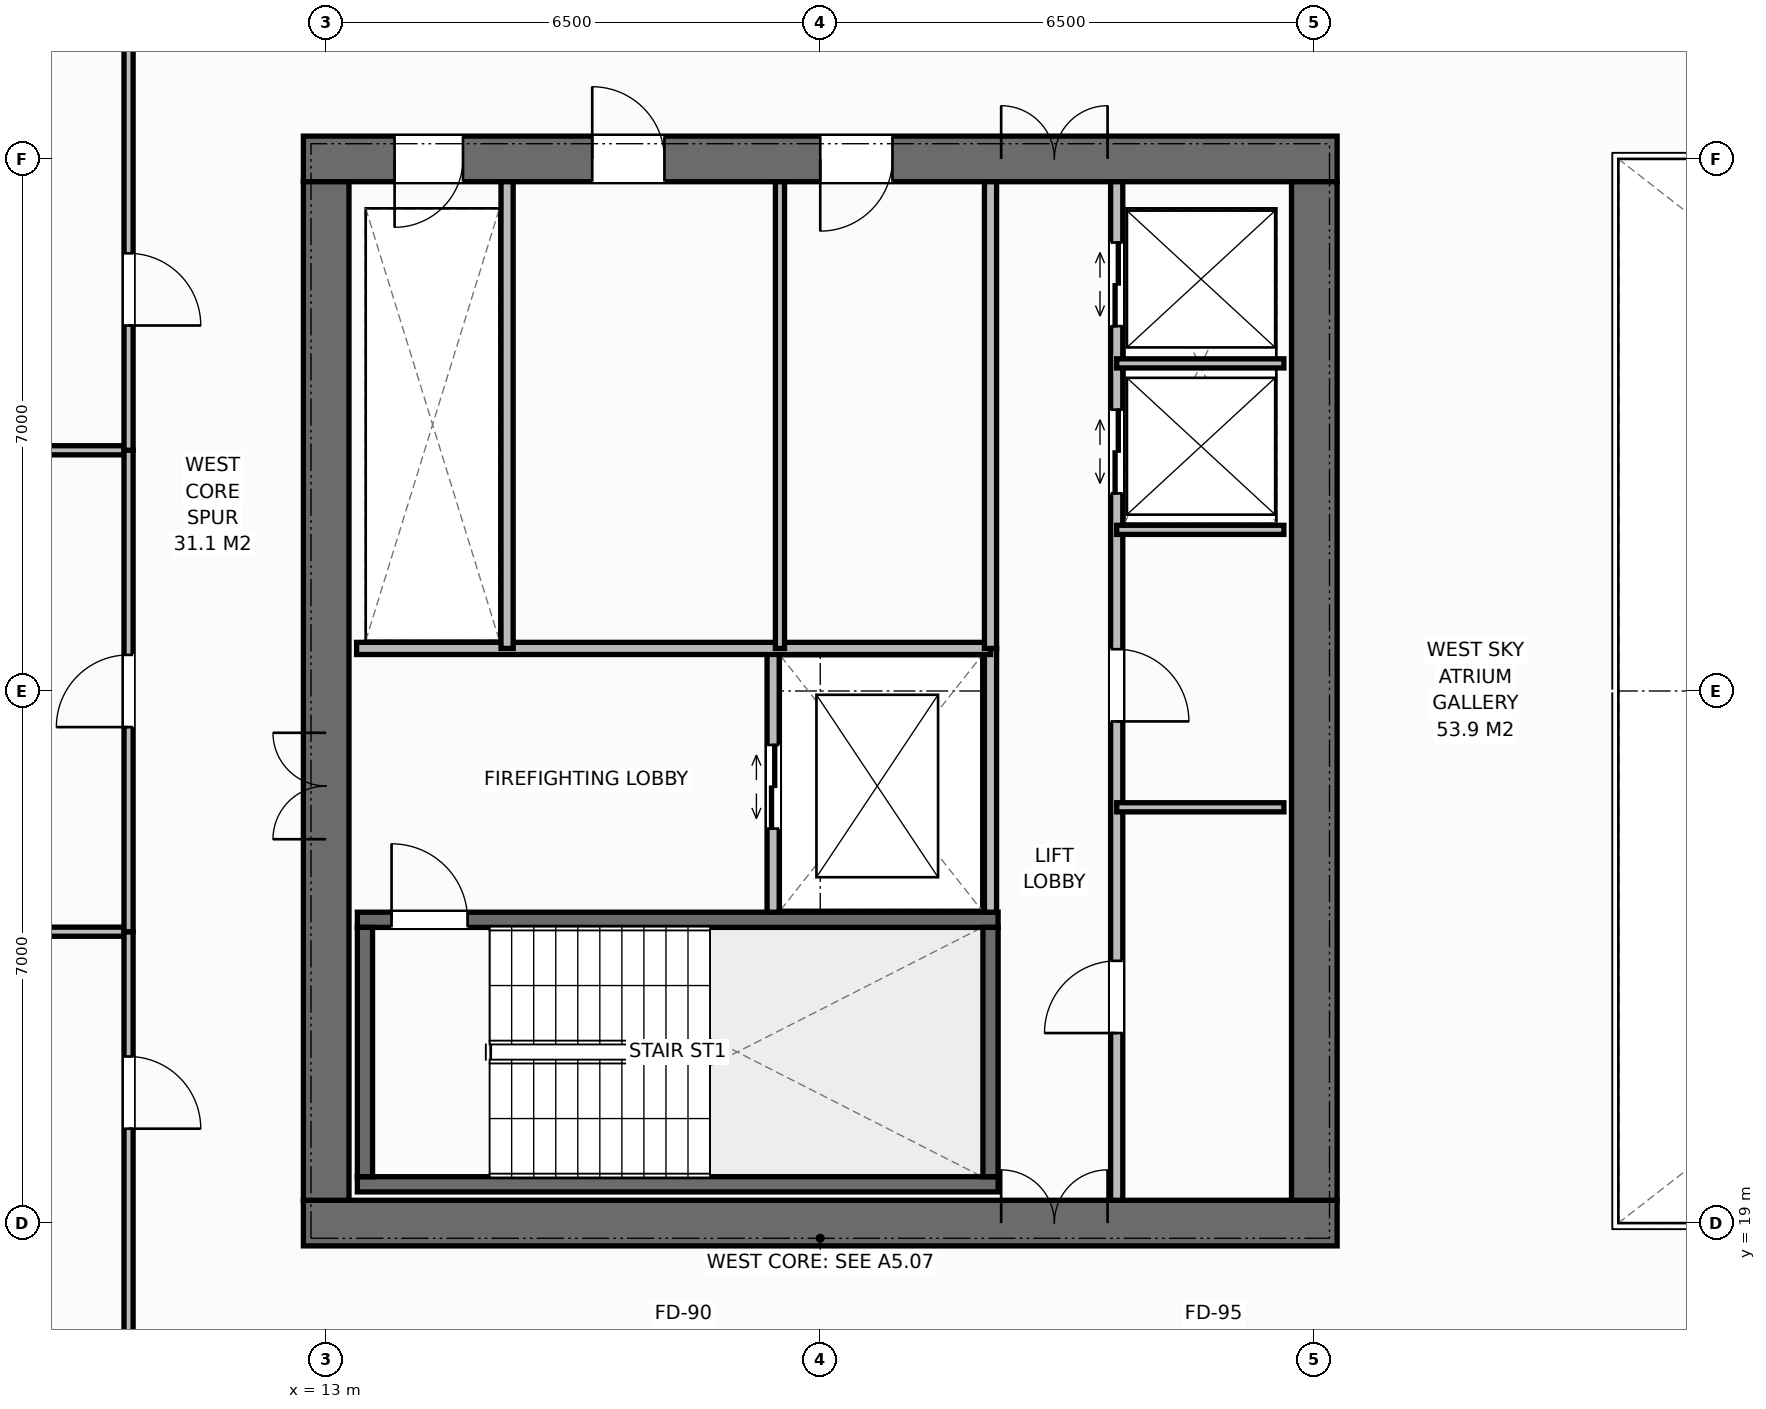
"""IFC4 building model, lengths in metres.
Left out: names, types, materials, properties, quantities, classifications, styles, units other than length and angle.
Written with IfcOpenShell. Run it as: python <this file> out.ifc"""

import sys

from ifc_helpers import new_model, si_unit, direction, frame, frame_2d, origin, place, context, subcontext, project, spatial, rectangle, extrude, element, fill, save


model = new_model("IFC4")
c1 = context("Model", 3, precision=1e-05, world=origin(), true_north=direction((0.0, 1.0)))
c2 = subcontext(c1, "Body", "Model", "MODEL_VIEW")
j1 = project(units=[si_unit("LENGTHUNIT", "METRE"), si_unit("PLANEANGLEUNIT", "RADIAN")], contexts=[c1])
p1 = place(None, origin())
s1 = spatial("IfcSite", under=j1, at=p1, CompositionType="ELEMENT")
p2 = place(p1, origin())
s2 = spatial("IfcBuilding", under=s1, at=p2, CompositionType="ELEMENT")
p3 = place(p2, frame((0.0, 0.0, 155.6)))
s3 = spatial("IfcBuildingStorey", under=s2, at=p3, CompositionType="ELEMENT", Elevation=155.6)
p4 = place(p3, frame((12.7, 19.0, 0.0), z_axis=(0.0, 0.0, 1.0), x_axis=(1.0, 0.0, 0.0)))
e1 = element("IfcWall", 1, at=p4, inside=s3, PredefinedType="SHEAR", context=c2, shape_type="SweptSolid", body=[
    extrude(rectangle(XDim=13.6, YDim=0.6, at=frame_2d((6.8, 0.0))), origin(), (0.0, 0.0, 1.0), 3.8),
])
p5 = place(p4, frame((9.18, 0.0, 0.0)))
e2 = element("IfcOpeningElement", 2, at=p5, cuts=e1, PredefinedType="OPENING", context=c2, shape_type="SweptSolid", body=[
    extrude(rectangle(XDim=1.4, YDim=2.2, at=frame_2d((0.7, 1.1))), frame((0.0, 0.31, 0.0), z_axis=(0.0, -1.0, 0.0), x_axis=(1.0, 0.0, 0.0)), (0.0, 0.0, 1.0), 0.62),
])
p6 = place(p3, frame((12.7, 33.0, 0.0), z_axis=(0.0, 0.0, 1.0), x_axis=(1.0, 0.0, 0.0)))
e3 = element("IfcWall", 3, at=p6, inside=s3, PredefinedType="SHEAR", context=c2, shape_type="SweptSolid", body=[
    extrude(rectangle(XDim=13.6, YDim=0.6, at=frame_2d((6.8, 0.0))), origin(), (0.0, 0.0, 1.0), 3.8),
])
p7 = place(p6, frame((1.2, 0.0, 0.0)))
e4 = element("IfcOpeningElement", 4, at=p7, cuts=e3, PredefinedType="OPENING", context=c2, shape_type="SweptSolid", body=[
    extrude(rectangle(XDim=0.9, YDim=2.15, at=frame_2d((0.45, 1.075))), frame((0.0, 0.31, 0.0), z_axis=(0.0, -1.0, 0.0), x_axis=(1.0, 0.0, 0.0)), (0.0, 0.0, 1.0), 0.62),
])
p8 = place(p6, frame((3.8, 0.0, 0.0)))
e5 = element("IfcOpeningElement", 5, at=p8, cuts=e3, PredefinedType="OPENING", context=c2, shape_type="SweptSolid", body=[
    extrude(rectangle(XDim=0.95, YDim=2.15, at=frame_2d((0.475, 1.075))), frame((0.0, 0.31, 0.0), z_axis=(0.0, -1.0, 0.0), x_axis=(1.0, 0.0, 0.0)), (0.0, 0.0, 1.0), 0.62),
])
p9 = place(p6, frame((6.8, 0.0, 0.0)))
e6 = element("IfcOpeningElement", 6, at=p9, cuts=e3, PredefinedType="OPENING", context=c2, shape_type="SweptSolid", body=[
    extrude(rectangle(XDim=0.95, YDim=2.15, at=frame_2d((0.475, 1.075))), frame((0.0, 0.31, 0.0), z_axis=(0.0, -1.0, 0.0), x_axis=(1.0, 0.0, 0.0)), (0.0, 0.0, 1.0), 0.62),
])
p10 = place(p6, frame((9.18, 0.0, 0.0)))
e7 = element("IfcOpeningElement", 7, at=p10, cuts=e3, PredefinedType="OPENING", context=c2, shape_type="SweptSolid", body=[
    extrude(rectangle(XDim=1.4, YDim=2.2, at=frame_2d((0.7, 1.1))), frame((0.0, 0.31, 0.0), z_axis=(0.0, -1.0, 0.0), x_axis=(1.0, 0.0, 0.0)), (0.0, 0.0, 1.0), 0.62),
])
p11 = place(p3, frame((13.0, 19.3, 0.0), z_axis=(0.0, 0.0, 1.0), x_axis=(0.0, 1.0, 0.0)))
e8 = element("IfcWall", 8, at=p11, inside=s3, PredefinedType="SHEAR", context=c2, shape_type="SweptSolid", body=[
    extrude(rectangle(XDim=13.4, YDim=0.6, at=frame_2d((6.7, 0.0))), origin(), (0.0, 0.0, 1.0), 3.8),
])
p12 = place(p11, frame((4.75, 0.0, 0.0)))
e9 = element("IfcOpeningElement", 9, at=p12, cuts=e8, PredefinedType="OPENING", context=c2, shape_type="SweptSolid", body=[
    extrude(rectangle(XDim=1.4, YDim=2.2, at=frame_2d((0.7, 1.1))), frame((0.0, 0.31, 0.0), z_axis=(0.0, -1.0, 0.0), x_axis=(1.0, 0.0, 0.0)), (0.0, 0.0, 1.0), 0.62),
])
p13 = place(p3, frame((26.0, 19.3, 0.0), z_axis=(0.0, 0.0, 1.0), x_axis=(0.0, 1.0, 0.0)))
e10 = element("IfcWall", 10, at=p13, inside=s3, PredefinedType="SHEAR", context=c2, shape_type="SweptSolid", body=[
    extrude(rectangle(XDim=13.4, YDim=0.6, at=frame_2d((6.7, 0.0))), origin(), (0.0, 0.0, 1.0), 3.8),
])
p14 = place(p3, frame((13.41, 19.51, 0.0), z_axis=(0.0, 0.0, 1.0), x_axis=(1.0, 0.0, 0.0)))
e11 = element("IfcWall", 11, at=p14, inside=s3, PredefinedType="SHEAR", context=c2, shape_type="SweptSolid", body=[
    extrude(rectangle(XDim=8.43, YDim=0.2, at=frame_2d((4.215, 0.0))), origin(), (0.0, 0.0, 1.0), 3.8),
])
p15 = place(p3, frame((13.41, 22.99, 0.0), z_axis=(0.0, 0.0, 1.0), x_axis=(1.0, 0.0, 0.0)))
e12 = element("IfcWall", 12, at=p15, inside=s3, PredefinedType="SHEAR", context=c2, shape_type="SweptSolid", body=[
    extrude(rectangle(XDim=8.43, YDim=0.2, at=frame_2d((4.215, 0.0))), origin(), (0.0, 0.0, 1.0), 3.8),
])
p16 = place(p15, frame((0.45, 0.0, 0.0)))
e13 = element("IfcOpeningElement", 13, at=p16, cuts=e12, PredefinedType="OPENING", context=c2, shape_type="SweptSolid", body=[
    extrude(rectangle(XDim=1.0, YDim=2.15, at=frame_2d((0.5, 1.075))), frame((0.0, 0.11, 0.0), z_axis=(0.0, -1.0, 0.0), x_axis=(1.0, 0.0, 0.0)), (0.0, 0.0, 1.0), 0.22),
])
for number, where, z_axis, x_axis in (
    (14, (13.51, 19.61, 0.0), (0.0, 0.0, 1.0), (0.0, 1.0, 0.0)),
    (15, (21.74, 19.61, 0.0), (0.0, 0.0, 1.0), (0.0, 1.0, 0.0)),
):
    element("IfcWall", number, at=place(p3, frame(where, z_axis=z_axis, x_axis=x_axis)), inside=s3, PredefinedType="SHEAR", context=c2, shape_type="SweptSolid", body=[
        extrude(rectangle(XDim=3.28, YDim=0.2, at=frame_2d((1.64, 0.0))), origin(), (0.0, 0.0, 1.0), 3.8),
    ])
p17 = place(p3, frame((21.74, 23.09, 0.0), z_axis=(0.0, 0.0, 1.0), x_axis=(0.0, 1.0, 0.0)))
e16 = element("IfcWall", 16, at=p17, inside=s3, PredefinedType="STANDARD", context=c2, shape_type="SweptSolid", body=[
    extrude(rectangle(XDim=3.47, YDim=0.16, at=frame_2d((1.735, 0.0))), origin(), (0.0, 0.0, 1.0), 3.572),
])
p18 = place(p3, frame((18.88, 23.09, 0.0), z_axis=(0.0, 0.0, 1.0), x_axis=(0.0, 1.0, 0.0)))
e17 = element("IfcWall", 17, at=p18, inside=s3, PredefinedType="STANDARD", context=c2, shape_type="SweptSolid", body=[
    extrude(rectangle(XDim=3.47, YDim=0.16, at=frame_2d((1.735, 0.0))), origin(), (0.0, 0.0, 1.0), 3.572),
])
p19 = place(p18, frame((1.1, 0.0, 0.0)))
e18 = element("IfcOpeningElement", 18, at=p19, cuts=e17, PredefinedType="OPENING", context=c2, shape_type="SweptSolid", body=[
    extrude(rectangle(XDim=1.1, YDim=2.2, at=frame_2d((0.55, 1.1))), frame((0.0, 0.09, 0.0), z_axis=(0.0, -1.0, 0.0), x_axis=(1.0, 0.0, 0.0)), (0.0, 0.0, 1.0), 0.18),
])
p20 = place(p3, frame((13.4, 26.56, 0.0), z_axis=(0.0, 0.0, 1.0), x_axis=(1.0, 0.0, 0.0)))
e19 = element("IfcWall", 19, at=p20, inside=s3, PredefinedType="STANDARD", context=c2, shape_type="SweptSolid", body=[
    extrude(rectangle(XDim=8.34, YDim=0.16, at=frame_2d((4.17, 0.0))), origin(), (0.0, 0.0, 1.0), 3.572),
])
p21 = place(p3, frame((15.38, 26.56, 0.0), z_axis=(0.0, 0.0, 1.0), x_axis=(0.0, 1.0, 0.0)))
e20 = element("IfcWall", 20, at=p21, inside=s3, PredefinedType="STANDARD", context=c2, shape_type="SweptSolid", body=[
    extrude(rectangle(XDim=6.14, YDim=0.16, at=frame_2d((3.07, 0.0))), origin(), (0.0, 0.0, 1.0), 3.572),
])
p22 = place(p3, frame((18.97, 26.56, 0.0), z_axis=(0.0, 0.0, 1.0), x_axis=(0.0, 1.0, 0.0)))
e21 = element("IfcWall", 21, at=p22, inside=s3, PredefinedType="PARTITIONING", context=c2, shape_type="SweptSolid", body=[
    extrude(rectangle(XDim=6.14, YDim=0.12, at=frame_2d((3.07, 0.0))), origin(), (0.0, 0.0, 1.0), 3.572),
])
p23 = place(p3, frame((21.74, 26.56, 0.0), z_axis=(0.0, 0.0, 1.0), x_axis=(0.0, 1.0, 0.0)))
e22 = element("IfcWall", 22, at=p23, inside=s3, PredefinedType="STANDARD", context=c2, shape_type="SweptSolid", body=[
    extrude(rectangle(XDim=6.14, YDim=0.16, at=frame_2d((3.07, 0.0))), origin(), (0.0, 0.0, 1.0), 3.572),
])
p24 = place(p3, frame((23.4, 19.3, 0.0), z_axis=(0.0, 0.0, 1.0), x_axis=(0.0, 1.0, 0.0)))
e23 = element("IfcWall", 23, at=p24, inside=s3, PredefinedType="STANDARD", context=c2, shape_type="SweptSolid", body=[
    extrude(rectangle(XDim=13.4, YDim=0.16, at=frame_2d((6.7, 0.0))), origin(), (0.0, 0.0, 1.0), 3.572),
])
p25 = place(p24, frame((2.2, 0.0, 0.0)))
e24 = element("IfcOpeningElement", 24, at=p25, cuts=e23, PredefinedType="OPENING", context=c2, shape_type="SweptSolid", body=[
    extrude(rectangle(XDim=0.95, YDim=2.15, at=frame_2d((0.475, 1.075))), frame((0.0, 0.09, 0.0), z_axis=(0.0, -1.0, 0.0), x_axis=(1.0, 0.0, 0.0)), (0.0, 0.0, 1.0), 0.18),
])
p26 = place(p24, frame((6.3, 0.0, 0.0)))
e25 = element("IfcOpeningElement", 25, at=p26, cuts=e23, PredefinedType="OPENING", context=c2, shape_type="SweptSolid", body=[
    extrude(rectangle(XDim=0.95, YDim=2.15, at=frame_2d((0.475, 1.075))), frame((0.0, 0.09, 0.0), z_axis=(0.0, -1.0, 0.0), x_axis=(1.0, 0.0, 0.0)), (0.0, 0.0, 1.0), 0.18),
])
p27 = place(p24, frame((9.3, 0.0, 0.0)))
e26 = element("IfcOpeningElement", 26, at=p27, cuts=e23, PredefinedType="OPENING", context=c2, shape_type="SweptSolid", body=[
    extrude(rectangle(XDim=1.1, YDim=2.2, at=frame_2d((0.55, 1.1))), frame((0.0, 0.09, 0.0), z_axis=(0.0, -1.0, 0.0), x_axis=(1.0, 0.0, 0.0)), (0.0, 0.0, 1.0), 0.18),
])
p28 = place(p24, frame((11.5, 0.0, 0.0)))
e27 = element("IfcOpeningElement", 27, at=p28, cuts=e23, PredefinedType="OPENING", context=c2, shape_type="SweptSolid", body=[
    extrude(rectangle(XDim=1.1, YDim=2.2, at=frame_2d((0.55, 1.1))), frame((0.0, 0.09, 0.0), z_axis=(0.0, -1.0, 0.0), x_axis=(1.0, 0.0, 0.0)), (0.0, 0.0, 1.0), 0.18),
])
for number, where, z_axis, x_axis in (
    (28, (23.4, 24.47, 0.0), (0.0, 0.0, 1.0), (1.0, 0.0, 0.0)),
    (29, (23.4, 28.12, 0.0), (0.0, 0.0, 1.0), (1.0, 0.0, 0.0)),
    (30, (23.4, 30.31, 0.0), (0.0, 0.0, 1.0), (1.0, 0.0, 0.0)),
):
    element("IfcWall", number, at=place(p3, frame(where, z_axis=z_axis, x_axis=x_axis)), inside=s3, PredefinedType="PARTITIONING", context=c2, shape_type="SweptSolid", body=[
        extrude(rectangle(XDim=2.2, YDim=0.12, at=frame_2d((1.1, 0.0))), origin(), (0.0, 0.0, 1.0), 3.572),
    ])
p29 = place(p3, frame((3.82, 22.833, 0.0), z_axis=(0.0, 0.0, 1.0), x_axis=(1.0, 0.0, 0.0)))
e31 = element("IfcWall", 31, at=p29, inside=s3, PredefinedType="PARTITIONING", context=c2, shape_type="SweptSolid", body=[
    extrude(rectangle(XDim=6.58, YDim=0.12, at=frame_2d((3.29, 0.0))), origin(), (0.0, 0.0, 1.0), 3.572),
])
p30 = place(p3, frame((10.4, 16.5, 0.0), z_axis=(0.0, 0.0, 1.0), x_axis=(0.0, 1.0, 0.0)))
e32 = element("IfcWall", 32, at=p30, inside=s3, PredefinedType="PARTITIONING", context=c2, shape_type="SweptSolid", body=[
    extrude(rectangle(XDim=6.333, YDim=0.12, at=frame_2d((3.167, 0.0))), origin(), (0.0, 0.0, 1.0), 3.572),
])
p31 = place(p30, frame((3.742, 0.0, 0.0)))
e33 = element("IfcOpeningElement", 33, at=p31, cuts=e32, PredefinedType="OPENING", context=c2, shape_type="SweptSolid", body=[
    extrude(rectangle(XDim=0.95, YDim=2.15, at=frame_2d((0.475, 1.075))), frame((0.0, 0.07, 0.0), z_axis=(0.0, -1.0, 0.0), x_axis=(1.0, 0.0, 0.0)), (0.0, 0.0, 1.0), 0.14),
])
p32 = place(p3, frame((3.82, 29.167, 0.0), z_axis=(0.0, 0.0, 1.0), x_axis=(1.0, 0.0, 0.0)))
e34 = element("IfcWall", 34, at=p32, inside=s3, PredefinedType="PARTITIONING", context=c2, shape_type="SweptSolid", body=[
    extrude(rectangle(XDim=6.58, YDim=0.12, at=frame_2d((3.29, 0.0))), origin(), (0.0, 0.0, 1.0), 3.572),
])
p33 = place(p3, frame((10.4, 22.833, 0.0), z_axis=(0.0, 0.0, 1.0), x_axis=(0.0, 1.0, 0.0)))
e35 = element("IfcWall", 35, at=p33, inside=s3, PredefinedType="PARTITIONING", context=c2, shape_type="SweptSolid", body=[
    extrude(rectangle(XDim=6.333, YDim=0.12, at=frame_2d((3.167, 0.0))), origin(), (0.0, 0.0, 1.0), 3.572),
])
p34 = place(p33, frame((2.692, 0.0, 0.0)))
e36 = element("IfcOpeningElement", 36, at=p34, cuts=e35, PredefinedType="OPENING", context=c2, shape_type="SweptSolid", body=[
    extrude(rectangle(XDim=0.95, YDim=2.15, at=frame_2d((0.475, 1.075))), frame((0.0, 0.07, 0.0), z_axis=(0.0, -1.0, 0.0), x_axis=(1.0, 0.0, 0.0)), (0.0, 0.0, 1.0), 0.14),
])
p35 = place(p3, frame((10.4, 29.167, 0.0), z_axis=(0.0, 0.0, 1.0), x_axis=(0.0, 1.0, 0.0)))
e37 = element("IfcWall", 37, at=p35, inside=s3, PredefinedType="PARTITIONING", context=c2, shape_type="SweptSolid", body=[
    extrude(rectangle(XDim=6.333, YDim=0.12, at=frame_2d((3.167, 0.0))), origin(), (0.0, 0.0, 1.0), 3.572),
])
p36 = place(p35, frame((1.642, 0.0, 0.0)))
e38 = element("IfcOpeningElement", 38, at=p36, cuts=e37, PredefinedType="OPENING", context=c2, shape_type="SweptSolid", body=[
    extrude(rectangle(XDim=0.95, YDim=2.15, at=frame_2d((0.475, 1.075))), frame((0.0, 0.07, 0.0), z_axis=(0.0, -1.0, 0.0), x_axis=(1.0, 0.0, 0.0)), (0.0, 0.0, 1.0), 0.14),
])
p37 = place(p16, origin())
e39 = element("IfcDoor", 39, at=p37, inside=s3, OperationType="SINGLE_SWING_LEFT", PredefinedType="DOOR", context=c2, shape_type="SweptSolid", body=[
    extrude(rectangle(XDim=1.0, YDim=2.15, at=frame_2d((0.5, 1.075))), frame((0.0, 0.025, 0.0), z_axis=(0.0, -1.0, 0.0), x_axis=(1.0, 0.0, 0.0)), (0.0, 0.0, 1.0), 0.05),
])
fill(e13, e39)
p38 = place(p12, origin())
e40 = element("IfcDoor", 40, at=p38, inside=s3, OperationType="DOUBLE_DOOR_SINGLE_SWING", PredefinedType="DOOR", context=c2, shape_type="SweptSolid", body=[
    extrude(rectangle(XDim=1.4, YDim=2.2, at=frame_2d((0.7, 1.1))), frame((0.0, 0.025, 0.0), z_axis=(0.0, -1.0, 0.0), x_axis=(1.0, 0.0, 0.0)), (0.0, 0.0, 1.0), 0.05),
])
fill(e9, e40)
p39 = place(p19, origin())
e41 = element("IfcDoor", 41, at=p39, inside=s3, OperationType="DOUBLE_DOOR_SLIDING", PredefinedType="DOOR", context=c2, shape_type="SweptSolid", body=[
    extrude(rectangle(XDim=1.1, YDim=2.2, at=frame_2d((0.55, 1.1))), frame((0.0, 0.025, 0.0), z_axis=(0.0, -1.0, 0.0), x_axis=(1.0, 0.0, 0.0)), (0.0, 0.0, 1.0), 0.05),
])
fill(e18, e41)
p40 = place(p7, origin())
e42 = element("IfcDoor", 42, at=p40, inside=s3, OperationType="SINGLE_SWING_RIGHT", PredefinedType="DOOR", context=c2, shape_type="SweptSolid", body=[
    extrude(rectangle(XDim=0.9, YDim=2.15, at=frame_2d((0.45, 1.075))), frame((0.0, -0.025, 0.0), z_axis=(0.0, -1.0, 0.0), x_axis=(1.0, 0.0, 0.0)), (0.0, 0.0, 1.0), 0.05),
])
fill(e4, e42)
p41 = place(p8, origin())
e43 = element("IfcDoor", 43, at=p41, inside=s3, OperationType="SINGLE_SWING_LEFT", PredefinedType="DOOR", context=c2, shape_type="SweptSolid", body=[
    extrude(rectangle(XDim=0.95, YDim=2.15, at=frame_2d((0.475, 1.075))), frame((0.0, -0.025, 0.0), z_axis=(0.0, -1.0, 0.0), x_axis=(1.0, 0.0, 0.0)), (0.0, 0.0, 1.0), 0.05),
])
fill(e5, e43)
p42 = place(p9, origin())
e44 = element("IfcDoor", 44, at=p42, inside=s3, OperationType="SINGLE_SWING_RIGHT", PredefinedType="DOOR", context=c2, shape_type="SweptSolid", body=[
    extrude(rectangle(XDim=0.95, YDim=2.15, at=frame_2d((0.475, 1.075))), frame((0.0, -0.025, 0.0), z_axis=(0.0, -1.0, 0.0), x_axis=(1.0, 0.0, 0.0)), (0.0, 0.0, 1.0), 0.05),
])
fill(e6, e44)
p43 = place(p5, origin())
e45 = element("IfcDoor", 45, at=p43, inside=s3, OperationType="DOUBLE_DOOR_SINGLE_SWING", PredefinedType="DOOR", context=c2, shape_type="SweptSolid", body=[
    extrude(rectangle(XDim=1.4, YDim=2.2, at=frame_2d((0.7, 1.1))), frame((0.0, 0.075, 0.0), z_axis=(0.0, -1.0, 0.0), x_axis=(1.0, 0.0, 0.0)), (0.0, 0.0, 1.0), 0.05),
])
fill(e2, e45)
p44 = place(p10, origin())
e46 = element("IfcDoor", 46, at=p44, inside=s3, OperationType="DOUBLE_DOOR_SINGLE_SWING", PredefinedType="DOOR", context=c2, shape_type="SweptSolid", body=[
    extrude(rectangle(XDim=1.4, YDim=2.2, at=frame_2d((0.7, 1.1))), frame((0.0, -0.025, 0.0), z_axis=(0.0, -1.0, 0.0), x_axis=(1.0, 0.0, 0.0)), (0.0, 0.0, 1.0), 0.05),
])
fill(e7, e46)
p45 = place(p25, origin())
e47 = element("IfcDoor", 47, at=p45, inside=s3, OperationType="SINGLE_SWING_LEFT", PredefinedType="DOOR", context=c2, shape_type="SweptSolid", body=[
    extrude(rectangle(XDim=0.95, YDim=2.15, at=frame_2d((0.475, 1.075))), frame((0.0, 0.025, 0.0), z_axis=(0.0, -1.0, 0.0), x_axis=(1.0, 0.0, 0.0)), (0.0, 0.0, 1.0), 0.05),
])
fill(e24, e47)
p46 = place(p26, origin())
e48 = element("IfcDoor", 48, at=p46, inside=s3, OperationType="SINGLE_SWING_RIGHT", PredefinedType="DOOR", context=c2, shape_type="SweptSolid", body=[
    extrude(rectangle(XDim=0.95, YDim=2.15, at=frame_2d((0.475, 1.075))), frame((0.0, 0.025, 0.0), z_axis=(0.0, -1.0, 0.0), x_axis=(1.0, 0.0, 0.0)), (0.0, 0.0, 1.0), 0.05),
])
fill(e25, e48)
p47 = place(p27, origin())
e49 = element("IfcDoor", 49, at=p47, inside=s3, OperationType="DOUBLE_DOOR_SLIDING", PredefinedType="DOOR", context=c2, shape_type="SweptSolid", body=[
    extrude(rectangle(XDim=1.1, YDim=2.2, at=frame_2d((0.55, 1.1))), frame((0.0, 0.025, 0.0), z_axis=(0.0, -1.0, 0.0), x_axis=(1.0, 0.0, 0.0)), (0.0, 0.0, 1.0), 0.05),
])
fill(e26, e49)
p48 = place(p28, origin())
e50 = element("IfcDoor", 50, at=p48, inside=s3, OperationType="DOUBLE_DOOR_SLIDING", PredefinedType="DOOR", context=c2, shape_type="SweptSolid", body=[
    extrude(rectangle(XDim=1.1, YDim=2.2, at=frame_2d((0.55, 1.1))), frame((0.0, 0.025, 0.0), z_axis=(0.0, -1.0, 0.0), x_axis=(1.0, 0.0, 0.0)), (0.0, 0.0, 1.0), 0.05),
])
fill(e27, e50)
p49 = place(p31, origin())
e51 = element("IfcDoor", 51, at=p49, inside=s3, OperationType="SINGLE_SWING_RIGHT", PredefinedType="DOOR", context=c2, shape_type="SweptSolid", body=[
    extrude(rectangle(XDim=0.95, YDim=2.15, at=frame_2d((0.475, 1.075))), frame((0.0, 0.025, 0.0), z_axis=(0.0, -1.0, 0.0), x_axis=(1.0, 0.0, 0.0)), (0.0, 0.0, 1.0), 0.05),
])
fill(e33, e51)
p50 = place(p34, origin())
e52 = element("IfcDoor", 52, at=p50, inside=s3, OperationType="SINGLE_SWING_LEFT", PredefinedType="DOOR", context=c2, shape_type="SweptSolid", body=[
    extrude(rectangle(XDim=0.95, YDim=2.15, at=frame_2d((0.475, 1.075))), frame((0.0, 0.025, 0.0), z_axis=(0.0, -1.0, 0.0), x_axis=(1.0, 0.0, 0.0)), (0.0, 0.0, 1.0), 0.05),
])
fill(e36, e52)
p51 = place(p36, origin())
e53 = element("IfcDoor", 53, at=p51, inside=s3, OperationType="SINGLE_SWING_RIGHT", PredefinedType="DOOR", context=c2, shape_type="SweptSolid", body=[
    extrude(rectangle(XDim=0.95, YDim=2.15, at=frame_2d((0.475, 1.075))), frame((0.0, 0.025, 0.0), z_axis=(0.0, -1.0, 0.0), x_axis=(1.0, 0.0, 0.0)), (0.0, 0.0, 1.0), 0.05),
])
fill(e38, e53)
save(model, sys.argv[1])
